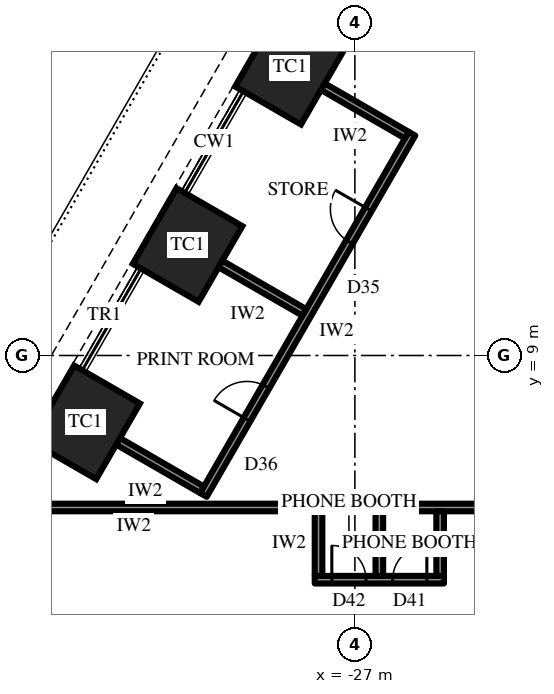
"""IFC4 building model, lengths in metres.
Left out: names, types, materials, properties, quantities, classifications, styles, units other than length and angle.
Written with IfcOpenShell. Run it as: python <this file> out.ifc"""

import sys

from ifc_helpers import new_model, si_unit, direction, frame, frame_2d, origin, origin_2d, place, context, subcontext, project, spatial, rectangle, extrude, element, fill, save


model = new_model("IFC4")
c1 = context("Model", 3, precision=1e-05, world=origin(), true_north=direction((0.0, 1.0)))
c2 = subcontext(c1, "Body", "Model", "MODEL_VIEW")
j1 = project(units=[si_unit("LENGTHUNIT", "METRE"), si_unit("PLANEANGLEUNIT", "RADIAN")], contexts=[c1])
p1 = place(None, origin())
s1 = spatial("IfcSite", under=j1, at=p1, CompositionType="ELEMENT")
p2 = place(p1, origin())
s2 = spatial("IfcBuilding", under=s1, at=p2, CompositionType="ELEMENT")
p3 = place(p2, frame((0.0, 0.0, 40.3)))
s3 = spatial("IfcBuildingStorey", under=s2, at=p3, CompositionType="ELEMENT", Elevation=40.3)
for number, where, z_axis, x_axis in (
    (1, (-28.709, 16.575, 0.0), (0.0, 0.0, 1.0), (-0.5, -0.866, 0.0)),
    (2, (-31.403, 11.908, 0.0), (0.0, 0.0, 1.0), (-0.5, -0.866, 0.0)),
    (3, (-34.097, 7.242, 0.0), (0.0, 0.0, 1.0), (-0.5, -0.866, 0.0)),
):
    element("IfcColumn", number, at=place(p3, frame(where, z_axis=z_axis, x_axis=x_axis)), inside=s3, PredefinedType="COLUMN", context=c2, shape_type="SweptSolid", body=[
        extrude(rectangle(XDim=2.3, YDim=2.0, at=origin_2d()), origin(), (0.0, 0.0, 1.0), 4.2),
    ])
p4 = place(p3, frame((-25.498, 14.837, 0.0), z_axis=(0.0, 0.0, 1.0), x_axis=(-0.499992624997, -0.866029661703, 0.0)))
e4 = element("IfcWall", 4, at=p4, inside=s3, PredefinedType="PARTITIONING", context=c2, shape_type="SweptSolid", body=[
    extrude(rectangle(XDim=10.977, YDim=0.2, at=frame_2d((5.489, 0.0))), origin(), (0.0, 0.0, 1.0), 4.0),
])
p5 = place(p4, frame((2.294, 0.0, 0.0)))
e5 = element("IfcOpeningElement", 5, at=p5, cuts=e4, PredefinedType="OPENING", context=c2, shape_type="SweptSolid", body=[
    extrude(rectangle(XDim=1.0, YDim=2.2, at=frame_2d((0.5, 1.1))), frame((0.0, 0.11, 0.0), z_axis=(0.0, -1.0, 0.0), x_axis=(1.0, 0.0, 0.0)), (0.0, 0.0, 1.0), 0.22),
])
p6 = place(p4, frame((7.683, 0.0, 0.0)))
e6 = element("IfcOpeningElement", 6, at=p6, cuts=e4, PredefinedType="OPENING", context=c2, shape_type="SweptSolid", body=[
    extrude(rectangle(XDim=1.0, YDim=2.2, at=frame_2d((0.5, 1.1))), frame((0.0, 0.11, 0.0), z_axis=(0.0, -1.0, 0.0), x_axis=(1.0, 0.0, 0.0)), (0.0, 0.0, 1.0), 0.22),
])
p7 = place(p3, frame((-25.634, 14.8, 0.0), z_axis=(0.0, 0.0, 1.0), x_axis=(-0.866054858364, 0.499948979701, 0.0)))
e7 = element("IfcWall", 7, at=p7, inside=s3, PredefinedType="PARTITIONING", context=c2, shape_type="SweptSolid", body=[
    extrude(rectangle(XDim=2.55, YDim=0.2, at=frame_2d((1.275, 0.0))), origin(), (0.0, 0.0, 1.0), 4.0),
])
p8 = place(p3, frame((-28.329, 10.133, 0.0), z_axis=(0.0, 0.0, 1.0), x_axis=(-0.866013403995, 0.500020783669, 0.0)))
e8 = element("IfcWall", 8, at=p8, inside=s3, PredefinedType="PARTITIONING", context=c2, shape_type="SweptSolid", body=[
    extrude(rectangle(XDim=2.55, YDim=0.2, at=frame_2d((1.275, 0.0))), origin(), (0.0, 0.0, 1.0), 2.944),
])
p9 = place(p3, frame((-31.023, 5.467, 0.0), z_axis=(0.0, 0.0, 1.0), x_axis=(-0.865989465428, 0.500062241894, 0.0)))
e9 = element("IfcWall", 9, at=p9, inside=s3, PredefinedType="PARTITIONING", context=c2, shape_type="SweptSolid", body=[
    extrude(rectangle(XDim=2.55, YDim=0.2, at=frame_2d((1.275, 0.0))), origin(), (0.0, 0.0, 1.0), 2.944),
])
p10 = place(p3, frame((-21.1, 5.0, 0.0), z_axis=(0.0, 0.0, 1.0), x_axis=(-1.0, 0.0, 0.0)))
e10 = element("IfcWall", 10, at=p10, inside=s3, PredefinedType="PARTITIONING", context=c2, shape_type="SweptSolid", body=[
    extrude(rectangle(XDim=15.019, YDim=0.2, at=frame_2d((7.509, 0.0))), origin(), (0.0, 0.0, 1.0), 4.0),
])
p11 = place(p10, frame((1.002, 0.0, 0.0)))
e11 = element("IfcOpeningElement", 11, at=p11, cuts=e10, PredefinedType="OPENING", context=c2, shape_type="SweptSolid", body=[
    extrude(rectangle(XDim=1.0, YDim=2.2, at=frame_2d((0.5, 1.1))), frame((0.0, 0.11, 0.0), z_axis=(0.0, -1.0, 0.0), x_axis=(1.0, 0.0, 0.0)), (0.0, 0.0, 1.0), 0.22),
])
p12 = place(p3, frame((-24.657, 3.1, 0.0), z_axis=(0.0, 0.0, 1.0), x_axis=(-1.0, 0.0, 0.0)))
e12 = element("IfcWall", 12, at=p12, inside=s3, PredefinedType="PARTITIONING", context=c2, shape_type="SweptSolid", body=[
    extrude(rectangle(XDim=3.4, YDim=0.2, at=frame_2d((1.7, 0.0))), origin(), (0.0, 0.0, 1.0), 4.0),
])
p13 = place(p12, frame((0.45, 0.0, 0.0)))
e13 = element("IfcOpeningElement", 13, at=p13, cuts=e12, PredefinedType="OPENING", context=c2, shape_type="SweptSolid", body=[
    extrude(rectangle(XDim=0.9, YDim=2.2, at=frame_2d((0.45, 1.1))), frame((0.0, 0.11, 0.0), z_axis=(0.0, -1.0, 0.0), x_axis=(1.0, 0.0, 0.0)), (0.0, 0.0, 1.0), 0.22),
])
p14 = place(p12, frame((2.05, 0.0, 0.0)))
e14 = element("IfcOpeningElement", 14, at=p14, cuts=e12, PredefinedType="OPENING", context=c2, shape_type="SweptSolid", body=[
    extrude(rectangle(XDim=0.9, YDim=2.2, at=frame_2d((0.45, 1.1))), frame((0.0, 0.11, 0.0), z_axis=(0.0, -1.0, 0.0), x_axis=(1.0, 0.0, 0.0)), (0.0, 0.0, 1.0), 0.22),
])
for number, where, z_axis, x_axis in (
    (15, (-24.757, 4.9, 0.0), (0.0, 0.0, 1.0), (0.0, -1.0, 0.0)),
    (16, (-26.357, 4.9, 0.0), (0.0, 0.0, 1.0), (0.0, -1.0, 0.0)),
    (17, (-27.957, 4.9, 0.0), (0.0, 0.0, 1.0), (0.0, -1.0, 0.0)),
):
    element("IfcWall", number, at=place(p3, frame(where, z_axis=z_axis, x_axis=x_axis)), inside=s3, PredefinedType="PARTITIONING", context=c2, shape_type="SweptSolid", body=[
        extrude(rectangle(XDim=1.7, YDim=0.2, at=frame_2d((0.85, 0.0))), origin(), (0.0, 0.0, 1.0), 4.0),
    ])
p15 = place(p5, frame((1.0, 0.0, 0.0), z_axis=(0.0, 0.0, 1.0), x_axis=(-1.0, 0.0, 0.0)))
e18 = element("IfcDoor", 18, at=p15, inside=s3, OperationType="SINGLE_SWING_LEFT", PredefinedType="DOOR", context=c2, shape_type="SweptSolid", body=[
    extrude(rectangle(XDim=1.0, YDim=2.2, at=frame_2d((0.5, 1.1))), frame((0.0, 0.025, 0.0), z_axis=(0.0, -1.0, 0.0), x_axis=(1.0, 0.0, 0.0)), (0.0, 0.0, 1.0), 0.05),
])
fill(e5, e18)
p16 = place(p6, frame((1.0, 0.0, 0.0), z_axis=(0.0, 0.0, 1.0), x_axis=(-1.0, 0.0, 0.0)))
e19 = element("IfcDoor", 19, at=p16, inside=s3, OperationType="SINGLE_SWING_RIGHT", PredefinedType="DOOR", context=c2, shape_type="SweptSolid", body=[
    extrude(rectangle(XDim=1.0, YDim=2.2, at=frame_2d((0.5, 1.1))), frame((0.0, 0.025, 0.0), z_axis=(0.0, -1.0, 0.0), x_axis=(1.0, 0.0, 0.0)), (0.0, 0.0, 1.0), 0.05),
])
fill(e6, e19)
p17 = place(p13, frame((0.9, 0.0, 0.0), z_axis=(0.0, 0.0, 1.0), x_axis=(-1.0, 0.0, 0.0)))
e20 = element("IfcDoor", 20, at=p17, inside=s3, OperationType="SINGLE_SWING_LEFT", PredefinedType="DOOR", context=c2, shape_type="SweptSolid", body=[
    extrude(rectangle(XDim=0.9, YDim=2.2, at=frame_2d((0.45, 1.1))), frame((0.0, 0.025, 0.0), z_axis=(0.0, -1.0, 0.0), x_axis=(1.0, 0.0, 0.0)), (0.0, 0.0, 1.0), 0.05),
])
fill(e13, e20)
p18 = place(p14, frame((0.9, 0.0, 0.0), z_axis=(0.0, 0.0, 1.0), x_axis=(-1.0, 0.0, 0.0)))
e21 = element("IfcDoor", 21, at=p18, inside=s3, OperationType="SINGLE_SWING_RIGHT", PredefinedType="DOOR", context=c2, shape_type="SweptSolid", body=[
    extrude(rectangle(XDim=0.9, YDim=2.2, at=frame_2d((0.45, 1.1))), frame((0.0, 0.025, 0.0), z_axis=(0.0, -1.0, 0.0), x_axis=(1.0, 0.0, 0.0)), (0.0, 0.0, 1.0), 0.05),
])
fill(e14, e21)
save(model, sys.argv[1])
